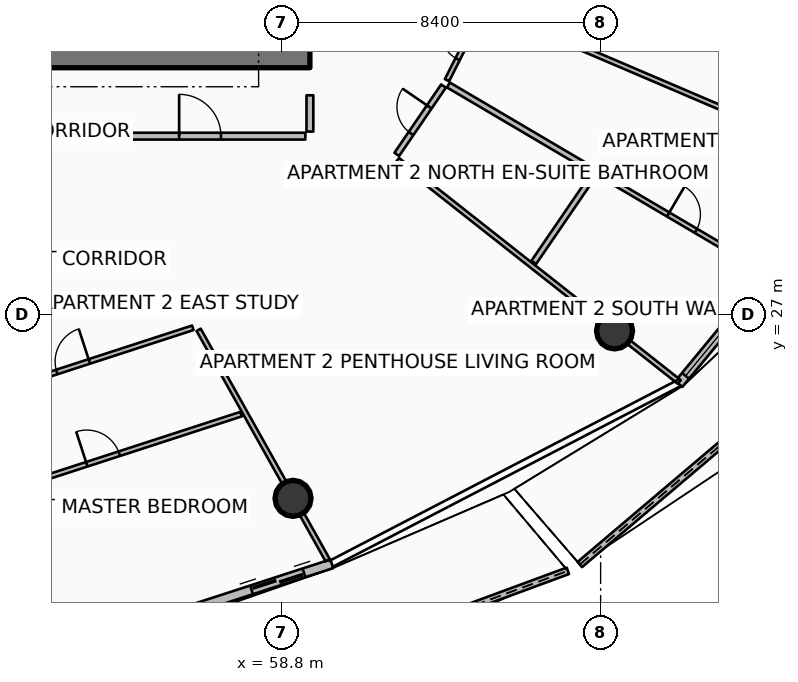
"""IFC4 building model, lengths in metres.
Left out: names, types, materials, properties, quantities, classifications, styles, units other than length and angle.
Written with IfcOpenShell. Run it as: python <this file> out.ifc"""

import sys

from ifc_helpers import new_model, si_unit, direction, frame, frame_2d, origin, origin_2d, place, context, subcontext, project, spatial, polyline, rectangle, circle, outline, extrude, element, fill, save


model = new_model("IFC4")
c1 = context("Model", 3, precision=1e-05, world=origin(), true_north=direction((0.0, 1.0)))
c2 = subcontext(c1, "Body", "Model", "MODEL_VIEW")
j1 = project(units=[si_unit("LENGTHUNIT", "METRE"), si_unit("PLANEANGLEUNIT", "RADIAN")], contexts=[c1])
p1 = place(None, origin())
s1 = spatial("IfcSite", under=j1, at=p1, CompositionType="ELEMENT")
p2 = place(p1, origin())
s2 = spatial("IfcBuilding", under=s1, at=p2, CompositionType="ELEMENT")
p3 = place(p2, frame((0.0, 0.0, 286.75)))
s3 = spatial("IfcBuildingStorey", under=s2, at=p3, CompositionType="ELEMENT", Elevation=286.75)
p4 = place(p3, frame((49.95, 33.75, 0.0), z_axis=(0.0, 0.0, 1.0), x_axis=(1.0, 0.0, 0.0)))
e1 = element("IfcWall", 1, at=p4, inside=s3, PredefinedType="SHEAR", context=c2, shape_type="SweptSolid", body=[
    extrude(rectangle(XDim=9.6, YDim=0.5, at=frame_2d((4.8, 0.0))), origin(), (0.0, 0.0, 1.0), 3.85),
])
for number, where, z_axis, x_axis in (
    (2, (59.105, 22.17, 0.0), (0.0, 0.0, 1.0), (1.0, 0.0, 0.0)),
    (3, (67.566, 26.575, 0.0), (0.0, 0.0, 1.0), (1.0, 0.0, 0.0)),
):
    element("IfcColumn", number, at=place(p3, frame(where, z_axis=z_axis, x_axis=x_axis)), inside=s3, PredefinedType="COLUMN", context=c2, shape_type="SweptSolid", body=[
        extrude(circle(Radius=0.475, at=origin_2d()), origin(), (0.0, 0.0, 1.0), 3.59),
    ])
p5 = place(p3, frame((56.382, 16.59, 0.0), z_axis=(0.0, 0.0, 1.0), x_axis=(0.938191788678, 0.346115829828, 0.0)))
e4 = element("IfcWall", 4, at=p5, inside=s3, PredefinedType="PARAPET", context=c2, shape_type="SweptSolid", body=[
    extrude(outline(polyline([(0.0, 0.0), (10.611, 0.0), (10.611, 1.86), (5.305, 1.798), (0.0, 1.632), (0.0, 0.0)])), frame((0.0, 0.09, 0.0), z_axis=(0.0, -1.0, 0.0), x_axis=(1.0, 0.0, 0.0)), (0.0, 0.0, 1.0), 0.18),
])
p6 = place(p3, frame((66.652, 20.429, 0.0), z_axis=(0.0, 0.0, 1.0), x_axis=(0.762735629532, 0.646710413896, 0.0)))
e5 = element("IfcWall", 5, at=p6, inside=s3, PredefinedType="PARAPET", context=c2, shape_type="SweptSolid", body=[
    extrude(outline(polyline([(0.0, 0.0), (11.535, 0.0), (11.535, 1.632), (5.768, 1.798), (0.0, 1.86), (0.0, 0.0)])), frame((0.0, 0.09, 0.0), z_axis=(0.0, -1.0, 0.0), x_axis=(1.0, 0.0, 0.0)), (0.0, 0.0, 1.0), 0.18),
])
p7 = place(p3, frame((50.858, 17.436, 0.0), z_axis=(0.0, 0.0, 1.0), x_axis=(0.951055974609, 0.309018661507, 0.0)))
e6 = element("IfcWall", 6, at=p7, inside=s3, PredefinedType="SOLIDWALL", context=c2, shape_type="SweptSolid", body=[
    extrude(rectangle(XDim=9.745, YDim=0.24, at=frame_2d((4.873, 0.0))), origin(), (0.0, 0.0, 1.0), 2.54),
])
p8 = place(p7, frame((7.525, 0.0, 0.0)))
e7 = element("IfcOpeningElement", 7, at=p8, cuts=e6, PredefinedType="OPENING", context=c2, shape_type="SweptSolid", body=[
    extrude(rectangle(XDim=1.45, YDim=2.15, at=frame_2d((0.725, 1.075))), frame((0.0, 0.13, 0.0), z_axis=(0.0, -1.0, 0.0), x_axis=(1.0, 0.0, 0.0)), (0.0, 0.0, 1.0), 0.26),
])
p9 = place(p7, frame((0.28, 0.0, 0.65)))
e8 = element("IfcOpeningElement", 8, at=p9, cuts=e6, PredefinedType="OPENING", context=c2, shape_type="SweptSolid", body=[
    extrude(rectangle(XDim=1.6, YDim=1.5, at=frame_2d((0.8, 0.75))), frame((0.0, 0.13, 0.0), z_axis=(0.0, -1.0, 0.0), x_axis=(1.0, 0.0, 0.0)), (0.0, 0.0, 1.0), 0.26),
])
p10 = place(p3, frame((69.258, 25.178, 0.0), z_axis=(0.0, 0.0, 1.0), x_axis=(0.636680093065, 0.771128043255, 0.0)))
e9 = element("IfcWall", 9, at=p10, inside=s3, PredefinedType="SOLIDWALL", context=c2, shape_type="SweptSolid", body=[
    extrude(rectangle(XDim=11.438, YDim=0.24, at=frame_2d((5.719, 0.0))), origin(), (0.0, 0.0, 1.0), 2.54),
])
p11 = place(p10, frame((9.218, 0.0, 0.0)))
e10 = element("IfcOpeningElement", 10, at=p11, cuts=e9, PredefinedType="OPENING", context=c2, shape_type="SweptSolid", body=[
    extrude(rectangle(XDim=1.45, YDim=2.15, at=frame_2d((0.725, 1.075))), frame((0.0, 0.13, 0.0), z_axis=(0.0, -1.0, 0.0), x_axis=(1.0, 0.0, 0.0)), (0.0, 0.0, 1.0), 0.26),
])
p12 = place(p10, frame((0.28, 0.0, 0.65)))
e11 = element("IfcOpeningElement", 11, at=p12, cuts=e9, PredefinedType="OPENING", context=c2, shape_type="SweptSolid", body=[
    extrude(rectangle(XDim=1.6, YDim=1.5, at=frame_2d((0.8, 0.75))), frame((0.0, 0.13, 0.0), z_axis=(0.0, -1.0, 0.0), x_axis=(1.0, 0.0, 0.0)), (0.0, 0.0, 1.0), 0.26),
])
p13 = place(p3, frame((53.888, 31.7, 0.0), z_axis=(0.0, 0.0, 1.0), x_axis=(1.0, 0.0, 0.0)))
e12 = element("IfcWall", 12, at=p13, inside=s3, PredefinedType="PARTITIONING", context=c2, shape_type="SweptSolid", body=[
    extrude(rectangle(XDim=5.542, YDim=0.18, at=frame_2d((2.771, 0.0))), origin(), (0.0, 0.0, 1.0), 2.957),
])
p14 = place(p13, frame((2.221, 0.0, 0.0)))
e13 = element("IfcOpeningElement", 13, at=p14, cuts=e12, PredefinedType="OPENING", context=c2, shape_type="SweptSolid", body=[
    extrude(rectangle(XDim=1.1, YDim=2.1, at=frame_2d((0.55, 1.05))), frame((0.0, 0.1, 0.0), z_axis=(0.0, -1.0, 0.0), x_axis=(1.0, 0.0, 0.0)), (0.0, 0.0, 1.0), 0.2),
])
p15 = place(p3, frame((59.55, 31.82, 0.0), z_axis=(0.0, 0.0, 1.0), x_axis=(0.0, 1.0, 0.0)))
e14 = element("IfcWall", 14, at=p15, inside=s3, PredefinedType="PARTITIONING", context=c2, shape_type="SweptSolid", body=[
    extrude(rectangle(XDim=0.955, YDim=0.18, at=frame_2d((0.477, 0.0))), origin(), (0.0, 0.0, 1.0), 2.957),
])
p16 = place(p3, frame((49.339, 31.7, 0.0), z_axis=(0.0, 0.0, 1.0), x_axis=(1.0, 0.0, 0.0)))
e15 = element("IfcWall", 15, at=p16, inside=s3, PredefinedType="PARTITIONING", context=c2, shape_type="SweptSolid", body=[
    extrude(rectangle(XDim=4.309, YDim=0.18, at=frame_2d((2.155, 0.0))), origin(), (0.0, 0.0, 1.0), 2.957),
])
p17 = place(p3, frame((56.622, 26.604, 0.0), z_axis=(0.0, 0.0, 1.0), x_axis=(0.488617277218, -0.872498227164, 0.0)))
e16 = element("IfcWall", 16, at=p17, inside=s3, PredefinedType="PARTITIONING", context=c2, shape_type="SweptSolid", body=[
    extrude(rectangle(XDim=6.949, YDim=0.125, at=frame_2d((3.474, 0.0))), origin(), (0.0, 0.0, 1.0), 2.957),
])
p18 = place(p3, frame((50.167, 24.61, 0.0), z_axis=(0.0, 0.0, 1.0), x_axis=(0.951054645086, 0.309022753306, 0.0)))
e17 = element("IfcWall", 17, at=p18, inside=s3, PredefinedType="PARTITIONING", context=c2, shape_type="SweptSolid", body=[
    extrude(rectangle(XDim=6.626, YDim=0.125, at=frame_2d((3.313, 0.0))), origin(), (0.0, 0.0, 1.0), 2.957),
])
p19 = place(p18, frame((2.863, 0.0, 0.0)))
e18 = element("IfcOpeningElement", 18, at=p19, cuts=e17, PredefinedType="OPENING", context=c2, shape_type="SweptSolid", body=[
    extrude(rectangle(XDim=0.9, YDim=2.08, at=frame_2d((0.45, 1.04))), frame((0.0, 0.073, 0.0), z_axis=(0.0, -1.0, 0.0), x_axis=(1.0, 0.0, 0.0)), (0.0, 0.0, 1.0), 0.145),
])
p20 = place(p3, frame((50.473, 22.025, 0.0), z_axis=(0.0, 0.0, 1.0), x_axis=(0.951058483557, 0.309010939699, 0.0)))
e19 = element("IfcWall", 19, at=p20, inside=s3, PredefinedType="PARTITIONING", context=c2, shape_type="SweptSolid", body=[
    extrude(rectangle(XDim=7.642, YDim=0.125, at=frame_2d((3.821, 0.0))), origin(), (0.0, 0.0, 1.0), 2.957),
])
p21 = place(p20, frame((3.371, 0.0, 0.0)))
e20 = element("IfcOpeningElement", 20, at=p21, cuts=e19, PredefinedType="OPENING", context=c2, shape_type="SweptSolid", body=[
    extrude(rectangle(XDim=0.9, YDim=2.08, at=frame_2d((0.45, 1.04))), frame((0.0, 0.073, 0.0), z_axis=(0.0, -1.0, 0.0), x_axis=(1.0, 0.0, 0.0)), (0.0, 0.0, 1.0), 0.145),
])
p22 = place(p3, frame((61.858, 31.075, 0.0), z_axis=(0.0, 0.0, 1.0), x_axis=(0.785325513659, -0.619083061952, 0.0)))
e21 = element("IfcWall", 21, at=p22, inside=s3, PredefinedType="PARTITIONING", context=c2, shape_type="SweptSolid", body=[
    extrude(rectangle(XDim=9.438, YDim=0.125, at=frame_2d((4.719, 0.0))), origin(), (0.0, 0.0, 1.0), 2.957),
])
p23 = place(p3, frame((61.836, 31.22, 0.0), z_axis=(0.0, 0.0, 1.0), x_axis=(0.564720073442, 0.825282520505, 0.0)))
e22 = element("IfcWall", 22, at=p23, inside=s3, PredefinedType="PARTITIONING", context=c2, shape_type="SweptSolid", body=[
    extrude(rectangle(XDim=2.178, YDim=0.15, at=frame_2d((1.089, 0.0))), origin(), (0.0, 0.0, 1.0), 2.957),
])
p24 = place(p23, frame((0.664, 0.0, 0.0)))
e23 = element("IfcOpeningElement", 23, at=p24, cuts=e22, PredefinedType="OPENING", context=c2, shape_type="SweptSolid", body=[
    extrude(rectangle(XDim=0.85, YDim=2.06, at=frame_2d((0.425, 1.03))), frame((0.0, 0.085, 0.0), z_axis=(0.0, -1.0, 0.0), x_axis=(1.0, 0.0, 0.0)), (0.0, 0.0, 1.0), 0.17),
])
p25 = place(p3, frame((65.44, 28.378, 0.0), z_axis=(0.0, 0.0, 1.0), x_axis=(0.564687043446, 0.82530512113, 0.0)))
e24 = element("IfcWall", 24, at=p25, inside=s3, PredefinedType="PARTITIONING", context=c2, shape_type="SweptSolid", body=[
    extrude(rectangle(XDim=2.798, YDim=0.15, at=frame_2d((1.399, 0.0))), origin(), (0.0, 0.0, 1.0), 2.957),
])
p26 = place(p3, frame((63.194, 33.046, 0.0), z_axis=(0.0, 0.0, 1.0), x_axis=(0.8615329034, -0.507701739566, 0.0)))
e25 = element("IfcWall", 25, at=p26, inside=s3, PredefinedType="PARTITIONING", context=c2, shape_type="SweptSolid", body=[
    extrude(rectangle(XDim=4.46, YDim=0.15, at=frame_2d((2.23, 0.0))), origin(), (0.0, 0.0, 1.0), 3.03),
])
p27 = place(p3, frame((67.149, 30.716, 0.0), z_axis=(0.0, 0.0, 1.0), x_axis=(0.861535840118, -0.507696756136, 0.0)))
e26 = element("IfcWall", 26, at=p27, inside=s3, PredefinedType="PARTITIONING", context=c2, shape_type="SweptSolid", body=[
    extrude(rectangle(XDim=5.092, YDim=0.125, at=frame_2d((2.546, 0.0))), origin(), (0.0, 0.0, 1.0), 3.03),
])
p28 = place(p27, frame((2.121, 0.0, 0.0)))
e27 = element("IfcOpeningElement", 27, at=p28, cuts=e26, PredefinedType="OPENING", context=c2, shape_type="SweptSolid", body=[
    extrude(rectangle(XDim=0.85, YDim=2.06, at=frame_2d((0.425, 1.03))), frame((0.0, 0.073, 0.0), z_axis=(0.0, -1.0, 0.0), x_axis=(1.0, 0.0, 0.0)), (0.0, 0.0, 1.0), 0.145),
])
p29 = place(p3, frame((64.219, 35.072, 0.0), z_axis=(0.0, 0.0, 1.0), x_axis=(0.91961011962, -0.392832315235, 0.0)))
e28 = element("IfcWall", 28, at=p29, inside=s3, PredefinedType="PARTITIONING", context=c2, shape_type="SweptSolid", body=[
    extrude(rectangle(XDim=10.493, YDim=0.125, at=frame_2d((5.247, 0.0))), origin(), (0.0, 0.0, 1.0), 3.03),
])
p30 = place(p3, frame((63.157, 33.172, 0.0), z_axis=(0.0, 0.0, 1.0), x_axis=(0.451230403471, 0.892407487073, 0.0)))
e29 = element("IfcWall", 29, at=p30, inside=s3, PredefinedType="PARTITIONING", context=c2, shape_type="SweptSolid", body=[
    extrude(rectangle(XDim=2.088, YDim=0.125, at=frame_2d((1.044, 0.0))), origin(), (0.0, 0.0, 1.0), 3.03),
])
p31 = place(p30, frame((0.619, 0.0, 0.0)))
e30 = element("IfcOpeningElement", 30, at=p31, cuts=e29, PredefinedType="OPENING", context=c2, shape_type="SweptSolid", body=[
    extrude(rectangle(XDim=0.85, YDim=2.06, at=frame_2d((0.425, 1.03))), frame((0.0, 0.073, 0.0), z_axis=(0.0, -1.0, 0.0), x_axis=(1.0, 0.0, 0.0)), (0.0, 0.0, 1.0), 0.145),
])
p32 = place(p8, origin())
e31 = element("IfcDoor", 31, at=p32, inside=s3, OperationType="DOUBLE_DOOR_SLIDING", PredefinedType="DOOR", context=c2, shape_type="SweptSolid", body=[
    extrude(rectangle(XDim=1.45, YDim=2.15, at=frame_2d((0.725, 1.075))), frame((0.0, 0.025, 0.0), z_axis=(0.0, -1.0, 0.0), x_axis=(1.0, 0.0, 0.0)), (0.0, 0.0, 1.0), 0.05),
])
fill(e7, e31)
p33 = place(p12, origin())
e32 = element("IfcWindow", 32, at=p33, inside=s3, PartitioningType="SINGLE_PANEL", PredefinedType="WINDOW", context=c2, shape_type="SweptSolid", body=[
    extrude(rectangle(XDim=1.6, YDim=1.5, at=frame_2d((0.8, 0.75))), frame((0.0, 0.03, 0.0), z_axis=(0.0, -1.0, 0.0), x_axis=(1.0, 0.0, 0.0)), (0.0, 0.0, 1.0), 0.06),
])
fill(e11, e32)
p34 = place(p14, origin())
e33 = element("IfcDoor", 33, at=p34, inside=s3, OperationType="SINGLE_SWING_LEFT", PredefinedType="DOOR", context=c2, shape_type="SweptSolid", body=[
    extrude(rectangle(XDim=1.1, YDim=2.1, at=frame_2d((0.55, 1.05))), frame((0.0, 0.025, 0.0), z_axis=(0.0, -1.0, 0.0), x_axis=(1.0, 0.0, 0.0)), (0.0, 0.0, 1.0), 0.05),
])
fill(e13, e33)
p35 = place(p19, origin())
e34 = element("IfcDoor", 34, at=p35, inside=s3, OperationType="SINGLE_SWING_RIGHT", PredefinedType="DOOR", context=c2, shape_type="SweptSolid", body=[
    extrude(rectangle(XDim=0.9, YDim=2.08, at=frame_2d((0.45, 1.04))), frame((0.0, 0.025, 0.0), z_axis=(0.0, -1.0, 0.0), x_axis=(1.0, 0.0, 0.0)), (0.0, 0.0, 1.0), 0.05),
])
fill(e18, e34)
p36 = place(p21, origin())
e35 = element("IfcDoor", 35, at=p36, inside=s3, OperationType="SINGLE_SWING_LEFT", PredefinedType="DOOR", context=c2, shape_type="SweptSolid", body=[
    extrude(rectangle(XDim=0.9, YDim=2.08, at=frame_2d((0.45, 1.04))), frame((0.0, 0.025, 0.0), z_axis=(0.0, -1.0, 0.0), x_axis=(1.0, 0.0, 0.0)), (0.0, 0.0, 1.0), 0.05),
])
fill(e20, e35)
p37 = place(p24, origin())
e36 = element("IfcDoor", 36, at=p37, inside=s3, OperationType="SINGLE_SWING_RIGHT", PredefinedType="DOOR", context=c2, shape_type="SweptSolid", body=[
    extrude(rectangle(XDim=0.85, YDim=2.06, at=frame_2d((0.425, 1.03))), frame((0.0, 0.025, 0.0), z_axis=(0.0, -1.0, 0.0), x_axis=(1.0, 0.0, 0.0)), (0.0, 0.0, 1.0), 0.05),
])
fill(e23, e36)
p38 = place(p28, origin())
e37 = element("IfcDoor", 37, at=p38, inside=s3, OperationType="SINGLE_SWING_LEFT", PredefinedType="DOOR", context=c2, shape_type="SweptSolid", body=[
    extrude(rectangle(XDim=0.85, YDim=2.06, at=frame_2d((0.425, 1.03))), frame((0.0, 0.025, 0.0), z_axis=(0.0, -1.0, 0.0), x_axis=(1.0, 0.0, 0.0)), (0.0, 0.0, 1.0), 0.05),
])
fill(e27, e37)
p39 = place(p31, origin())
e38 = element("IfcDoor", 38, at=p39, inside=s3, OperationType="SINGLE_SWING_RIGHT", PredefinedType="DOOR", context=c2, shape_type="SweptSolid", body=[
    extrude(rectangle(XDim=0.85, YDim=2.06, at=frame_2d((0.425, 1.03))), frame((0.0, 0.025, 0.0), z_axis=(0.0, -1.0, 0.0), x_axis=(1.0, 0.0, 0.0)), (0.0, 0.0, 1.0), 0.05),
])
fill(e30, e38)
save(model, sys.argv[1])
